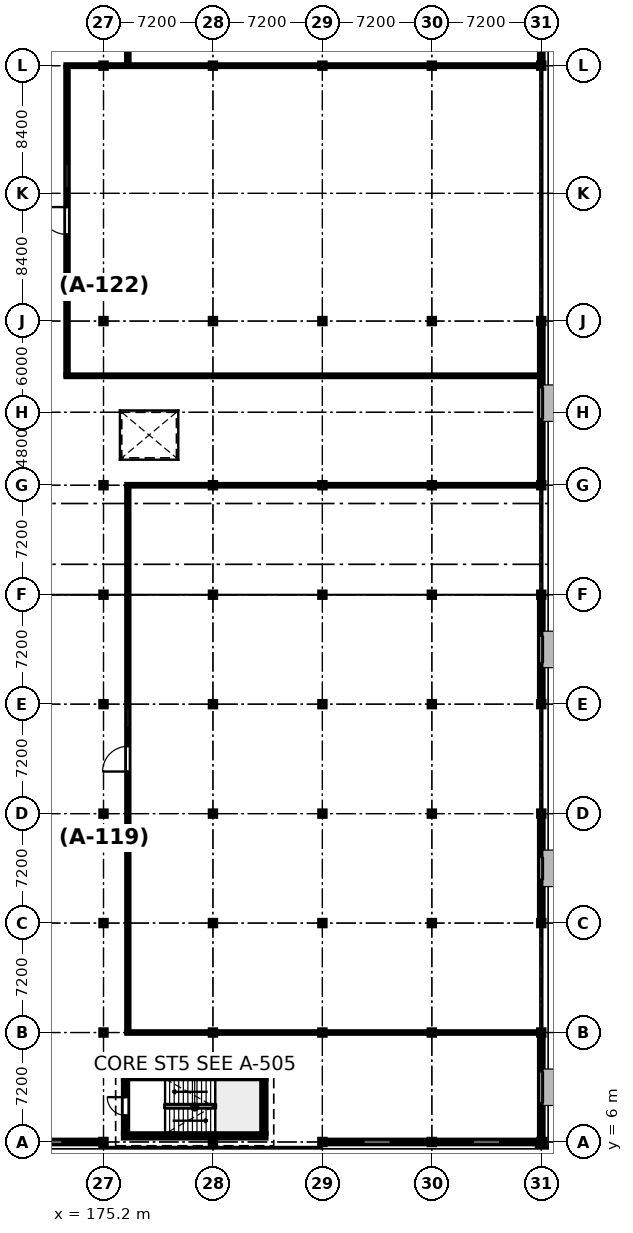
"""IFC4 building model, lengths in metres.
Left out: names, types, materials, properties, quantities, classifications, styles, units other than length and angle.
Written with IfcOpenShell. Run it as: python <this file> out.ifc"""

import sys

from ifc_helpers import new_model, si_unit, direction, frame, frame_2d, origin, origin_2d, place, context, subcontext, project, spatial, rectangle, i_section, extrude, element, fill, save


model = new_model("IFC4")
c1 = context("Model", 3, precision=1e-05, world=origin(), true_north=direction((0.0, 1.0)))
c2 = subcontext(c1, "Body", "Model", "MODEL_VIEW")
j1 = project(units=[si_unit("LENGTHUNIT", "METRE"), si_unit("PLANEANGLEUNIT", "RADIAN")], contexts=[c1])
p1 = place(None, origin())
s1 = spatial("IfcSite", under=j1, at=p1, CompositionType="ELEMENT")
p2 = place(p1, origin())
s2 = spatial("IfcBuilding", under=s1, at=p2, CompositionType="ELEMENT")
p3 = place(p2, frame((0.0, 0.0, 5.4)))
s3 = spatial("IfcBuildingStorey", under=s2, at=p3, CompositionType="ELEMENT", Elevation=5.4)
for number, where, z_axis, x_axis in (
    (1, (175.2, 6.0, 0.0), (0.0, 0.0, 1.0), (1.0, 0.0, 0.0)),
    (2, (175.2, 13.2, 0.0), (0.0, 0.0, 1.0), (1.0, 0.0, 0.0)),
    (3, (175.2, 20.4, 0.0), (0.0, 0.0, 1.0), (1.0, 0.0, 0.0)),
    (4, (175.2, 27.6, 0.0), (0.0, 0.0, 1.0), (1.0, 0.0, 0.0)),
    (5, (175.2, 34.8, 0.0), (0.0, 0.0, 1.0), (1.0, 0.0, 0.0)),
    (6, (175.2, 42.0, 0.0), (0.0, 0.0, 1.0), (1.0, 0.0, 0.0)),
    (7, (175.2, 49.2, 0.0), (0.0, 0.0, 1.0), (1.0, 0.0, 0.0)),
    (8, (175.2, 60.0, 0.0), (0.0, 0.0, 1.0), (1.0, 0.0, 0.0)),
    (9, (175.2, 76.8, 0.0), (0.0, 0.0, 1.0), (1.0, 0.0, 0.0)),
    (10, (182.4, 6.0, 0.0), (0.0, 0.0, 1.0), (1.0, 0.0, 0.0)),
    (11, (182.4, 13.2, 0.0), (0.0, 0.0, 1.0), (1.0, 0.0, 0.0)),
    (12, (182.4, 20.4, 0.0), (0.0, 0.0, 1.0), (1.0, 0.0, 0.0)),
    (13, (182.4, 27.6, 0.0), (0.0, 0.0, 1.0), (1.0, 0.0, 0.0)),
    (14, (182.4, 34.8, 0.0), (0.0, 0.0, 1.0), (1.0, 0.0, 0.0)),
    (15, (182.4, 42.0, 0.0), (0.0, 0.0, 1.0), (1.0, 0.0, 0.0)),
    (16, (182.4, 49.2, 0.0), (0.0, 0.0, 1.0), (1.0, 0.0, 0.0)),
    (17, (182.4, 60.0, 0.0), (0.0, 0.0, 1.0), (1.0, 0.0, 0.0)),
    (18, (182.4, 76.8, 0.0), (0.0, 0.0, 1.0), (1.0, 0.0, 0.0)),
    (19, (189.6, 6.0, 0.0), (0.0, 0.0, 1.0), (1.0, 0.0, 0.0)),
    (20, (189.6, 13.2, 0.0), (0.0, 0.0, 1.0), (1.0, 0.0, 0.0)),
    (21, (189.6, 20.4, 0.0), (0.0, 0.0, 1.0), (1.0, 0.0, 0.0)),
    (22, (189.6, 27.6, 0.0), (0.0, 0.0, 1.0), (1.0, 0.0, 0.0)),
    (23, (189.6, 34.8, 0.0), (0.0, 0.0, 1.0), (1.0, 0.0, 0.0)),
    (24, (189.6, 42.0, 0.0), (0.0, 0.0, 1.0), (1.0, 0.0, 0.0)),
    (25, (189.6, 49.2, 0.0), (0.0, 0.0, 1.0), (1.0, 0.0, 0.0)),
    (26, (189.6, 60.0, 0.0), (0.0, 0.0, 1.0), (1.0, 0.0, 0.0)),
    (27, (189.6, 76.8, 0.0), (0.0, 0.0, 1.0), (1.0, 0.0, 0.0)),
    (28, (196.8, 6.0, 0.0), (0.0, 0.0, 1.0), (1.0, 0.0, 0.0)),
    (29, (196.8, 13.2, 0.0), (0.0, 0.0, 1.0), (1.0, 0.0, 0.0)),
    (30, (196.8, 20.4, 0.0), (0.0, 0.0, 1.0), (1.0, 0.0, 0.0)),
    (31, (196.8, 27.6, 0.0), (0.0, 0.0, 1.0), (1.0, 0.0, 0.0)),
    (32, (196.8, 34.8, 0.0), (0.0, 0.0, 1.0), (1.0, 0.0, 0.0)),
    (33, (196.8, 42.0, 0.0), (0.0, 0.0, 1.0), (1.0, 0.0, 0.0)),
    (34, (196.8, 49.2, 0.0), (0.0, 0.0, 1.0), (1.0, 0.0, 0.0)),
    (35, (196.8, 60.0, 0.0), (0.0, 0.0, 1.0), (1.0, 0.0, 0.0)),
    (36, (196.8, 76.8, 0.0), (0.0, 0.0, 1.0), (1.0, 0.0, 0.0)),
    (37, (204.0, 6.0, 0.0), (0.0, 0.0, 1.0), (1.0, 0.0, 0.0)),
    (38, (204.0, 13.2, 0.0), (0.0, 0.0, 1.0), (1.0, 0.0, 0.0)),
    (39, (204.0, 20.4, 0.0), (0.0, 0.0, 1.0), (1.0, 0.0, 0.0)),
    (40, (204.0, 27.6, 0.0), (0.0, 0.0, 1.0), (1.0, 0.0, 0.0)),
    (41, (204.0, 34.8, 0.0), (0.0, 0.0, 1.0), (1.0, 0.0, 0.0)),
    (42, (204.0, 42.0, 0.0), (0.0, 0.0, 1.0), (1.0, 0.0, 0.0)),
    (43, (204.0, 49.2, 0.0), (0.0, 0.0, 1.0), (1.0, 0.0, 0.0)),
    (44, (204.0, 60.0, 0.0), (0.0, 0.0, 1.0), (1.0, 0.0, 0.0)),
    (45, (204.0, 76.8, 0.0), (0.0, 0.0, 1.0), (1.0, 0.0, 0.0)),
):
    element("IfcColumn", number, at=place(p3, frame(where, z_axis=z_axis, x_axis=x_axis)), inside=s3, PredefinedType="COLUMN", context=c2, shape_type="SweptSolid", body=[
        extrude(i_section(OverallWidth=0.373, OverallDepth=0.373, WebThickness=0.016, FlangeThickness=0.026, FilletRadius=0.015, at=origin_2d()), origin(), (0.0, 0.0, 1.0), 3.9),
    ])
p4 = place(p3, frame((204.0, 13.012, 0.0), z_axis=(0.0, 0.0, 1.0), x_axis=(0.0, -1.0, 0.0)))
e46 = element("IfcWall", 46, at=p4, inside=s3, PredefinedType="STANDARD", context=c2, shape_type="SweptSolid", body=[
    extrude(rectangle(XDim=6.824, YDim=0.26, at=frame_2d((3.412, 0.0))), origin(), (0.0, 0.0, 1.0), 3.043),
])
p5 = place(p4, frame((2.362, 0.0, 0.9)))
e47 = element("IfcOpeningElement", 47, at=p5, cuts=e46, PredefinedType="OPENING", context=c2, shape_type="SweptSolid", body=[
    extrude(rectangle(XDim=2.1, YDim=1.5, at=frame_2d((1.05, 0.75))), frame((0.0, 0.14, 0.0), z_axis=(0.0, -1.0, 0.0), x_axis=(1.0, 0.0, 0.0)), (0.0, 0.0, 1.0), 0.28),
])
p6 = place(p3, frame((204.0, 27.412, 0.0), z_axis=(0.0, 0.0, 1.0), x_axis=(0.0, -1.0, 0.0)))
e48 = element("IfcWall", 48, at=p6, inside=s3, PredefinedType="STANDARD", context=c2, shape_type="SweptSolid", body=[
    extrude(rectangle(XDim=6.824, YDim=0.26, at=frame_2d((3.412, 0.0))), origin(), (0.0, 0.0, 1.0), 3.043),
])
p7 = place(p6, frame((2.662, 0.0, 0.9)))
e49 = element("IfcOpeningElement", 49, at=p7, cuts=e48, PredefinedType="OPENING", context=c2, shape_type="SweptSolid", body=[
    extrude(rectangle(XDim=1.5, YDim=1.5, at=frame_2d((0.75, 0.75))), frame((0.0, 0.14, 0.0), z_axis=(0.0, -1.0, 0.0), x_axis=(1.0, 0.0, 0.0)), (0.0, 0.0, 1.0), 0.28),
])
p8 = place(p3, frame((204.0, 41.812, 0.0), z_axis=(0.0, 0.0, 1.0), x_axis=(0.0, -1.0, 0.0)))
e50 = element("IfcWall", 50, at=p8, inside=s3, PredefinedType="STANDARD", context=c2, shape_type="SweptSolid", body=[
    extrude(rectangle(XDim=6.824, YDim=0.26, at=frame_2d((3.412, 0.0))), origin(), (0.0, 0.0, 1.0), 3.043),
])
p9 = place(p8, frame((2.512, 0.0, 0.9)))
e51 = element("IfcOpeningElement", 51, at=p9, cuts=e50, PredefinedType="OPENING", context=c2, shape_type="SweptSolid", body=[
    extrude(rectangle(XDim=1.8, YDim=1.5, at=frame_2d((0.9, 0.75))), frame((0.0, 0.14, 0.0), z_axis=(0.0, -1.0, 0.0), x_axis=(1.0, 0.0, 0.0)), (0.0, 0.0, 1.0), 0.28),
])
p10 = place(p3, frame((204.0, 59.812, 0.0), z_axis=(0.0, 0.0, 1.0), x_axis=(0.0, -1.0, 0.0)))
e52 = element("IfcWall", 52, at=p10, inside=s3, PredefinedType="STANDARD", context=c2, shape_type="SweptSolid", body=[
    extrude(rectangle(XDim=10.424, YDim=0.26, at=frame_2d((5.212, 0.0))), origin(), (0.0, 0.0, 1.0), 3.043),
])
p11 = place(p10, frame((4.162, 0.0, 0.9)))
e53 = element("IfcOpeningElement", 53, at=p11, cuts=e52, PredefinedType="OPENING", context=c2, shape_type="SweptSolid", body=[
    extrude(rectangle(XDim=2.1, YDim=1.5, at=frame_2d((1.05, 0.75))), frame((0.0, 0.14, 0.0), z_axis=(0.0, -1.0, 0.0), x_axis=(1.0, 0.0, 0.0)), (0.0, 0.0, 1.0), 0.28),
])
p12 = place(p3, frame((204.0, 83.812, 0.0), z_axis=(0.0, 0.0, 1.0), x_axis=(0.0, -1.0, 0.0)))
e54 = element("IfcWall", 54, at=p12, inside=s3, PredefinedType="STANDARD", context=c2, shape_type="SweptSolid", body=[
    extrude(rectangle(XDim=6.824, YDim=0.26, at=frame_2d((3.412, 0.0))), origin(), (0.0, 0.0, 1.0), 3.043),
])
p13 = place(p12, frame((2.662, 0.0, 0.9)))
e55 = element("IfcOpeningElement", 55, at=p13, cuts=e54, PredefinedType="OPENING", context=c2, shape_type="SweptSolid", body=[
    extrude(rectangle(XDim=1.5, YDim=1.5, at=frame_2d((0.75, 0.75))), frame((0.0, 0.14, 0.0), z_axis=(0.0, -1.0, 0.0), x_axis=(1.0, 0.0, 0.0)), (0.0, 0.0, 1.0), 0.28),
])
p14 = place(p3, frame((175.006, 6.0, 0.0), z_axis=(0.0, 0.0, 1.0), x_axis=(-1.0, 0.0, 0.0)))
e56 = element("IfcWall", 56, at=p14, inside=s3, PredefinedType="STANDARD", context=c2, shape_type="SweptSolid", body=[
    extrude(rectangle(XDim=6.812, YDim=0.26, at=frame_2d((3.406, 0.0))), origin(), (0.0, 0.0, 1.0), 3.043),
])
p15 = place(p14, frame((2.506, 0.0, 0.9)))
e57 = element("IfcOpeningElement", 57, at=p15, cuts=e56, PredefinedType="OPENING", context=c2, shape_type="SweptSolid", body=[
    extrude(rectangle(XDim=1.8, YDim=1.5, at=frame_2d((0.9, 0.75))), frame((0.0, 0.14, 0.0), z_axis=(0.0, -1.0, 0.0), x_axis=(1.0, 0.0, 0.0)), (0.0, 0.0, 1.0), 0.28),
])
p16 = place(p3, frame((196.606, 6.0, 0.0), z_axis=(0.0, 0.0, 1.0), x_axis=(-1.0, 0.0, 0.0)))
e58 = element("IfcWall", 58, at=p16, inside=s3, PredefinedType="STANDARD", context=c2, shape_type="SweptSolid", body=[
    extrude(rectangle(XDim=6.812, YDim=0.26, at=frame_2d((3.406, 0.0))), origin(), (0.0, 0.0, 1.0), 3.043),
])
p17 = place(p16, frame((2.506, 0.0, 0.9)))
e59 = element("IfcOpeningElement", 59, at=p17, cuts=e58, PredefinedType="OPENING", context=c2, shape_type="SweptSolid", body=[
    extrude(rectangle(XDim=1.8, YDim=1.5, at=frame_2d((0.9, 0.75))), frame((0.0, 0.14, 0.0), z_axis=(0.0, -1.0, 0.0), x_axis=(1.0, 0.0, 0.0)), (0.0, 0.0, 1.0), 0.28),
])
p18 = place(p3, frame((203.806, 6.0, 0.0), z_axis=(0.0, 0.0, 1.0), x_axis=(-1.0, 0.0, 0.0)))
e60 = element("IfcWall", 60, at=p18, inside=s3, PredefinedType="STANDARD", context=c2, shape_type="SweptSolid", body=[
    extrude(rectangle(XDim=6.812, YDim=0.26, at=frame_2d((3.406, 0.0))), origin(), (0.0, 0.0, 1.0), 3.043),
])
p19 = place(p18, frame((2.506, 0.0, 0.9)))
e61 = element("IfcOpeningElement", 61, at=p19, cuts=e60, PredefinedType="OPENING", context=c2, shape_type="SweptSolid", body=[
    extrude(rectangle(XDim=1.8, YDim=1.5, at=frame_2d((0.9, 0.75))), frame((0.0, 0.14, 0.0), z_axis=(0.0, -1.0, 0.0), x_axis=(1.0, 0.0, 0.0)), (0.0, 0.0, 1.0), 0.28),
])
for number, where, z_axis, x_axis in (
    (62, (185.9, 6.4, 0.0), (0.0, 0.0, 1.0), (-1.0, 0.0, 0.0)),
    (63, (176.5, 10.3, 0.0), (0.0, 0.0, 1.0), (1.0, 0.0, 0.0)),
):
    element("IfcWall", number, at=place(p3, frame(where, z_axis=z_axis, x_axis=x_axis)), inside=s3, PredefinedType="SOLIDWALL", context=c2, shape_type="SweptSolid", body=[
        extrude(rectangle(XDim=9.4, YDim=0.3, at=frame_2d((4.7, 0.0))), origin(), (0.0, 0.0, 1.0), 3.67),
    ])
p20 = place(p3, frame((176.65, 6.55, 0.0), z_axis=(0.0, 0.0, 1.0), x_axis=(0.0, 1.0, 0.0)))
e64 = element("IfcWall", 64, at=p20, inside=s3, PredefinedType="SOLIDWALL", context=c2, shape_type="SweptSolid", body=[
    extrude(rectangle(XDim=3.6, YDim=0.3, at=frame_2d((1.8, 0.0))), origin(), (0.0, 0.0, 1.0), 3.67),
])
p21 = place(p20, frame((1.2, 0.0, 0.0)))
e65 = element("IfcOpeningElement", 65, at=p21, cuts=e64, PredefinedType="OPENING", context=c2, shape_type="SweptSolid", body=[
    extrude(rectangle(XDim=1.2, YDim=2.2, at=frame_2d((0.6, 1.1))), frame((0.0, 0.16, 0.0), z_axis=(0.0, -1.0, 0.0), x_axis=(1.0, 0.0, 0.0)), (0.0, 0.0, 1.0), 0.32),
])
p22 = place(p3, frame((185.75, 10.15, 0.0), z_axis=(0.0, 0.0, 1.0), x_axis=(0.0, -1.0, 0.0)))
e66 = element("IfcWall", 66, at=p22, inside=s3, PredefinedType="SOLIDWALL", context=c2, shape_type="SweptSolid", body=[
    extrude(rectangle(XDim=3.6, YDim=0.3, at=frame_2d((1.8, 0.0))), origin(), (0.0, 0.0, 1.0), 3.67),
])
p23 = place(p3, frame((203.868, 13.2, 0.0), z_axis=(0.0, 0.0, 1.0), x_axis=(-1.0, 0.0, 0.0)))
e67 = element("IfcWall", 67, at=p23, inside=s3, PredefinedType="PARTITIONING", context=c2, shape_type="SweptSolid", body=[
    extrude(rectangle(XDim=27.148, YDim=0.125, at=frame_2d((13.574, 0.0))), origin(), (0.0, 0.0, 1.0), 3.038),
])
p24 = place(p3, frame((176.72, 49.2, 0.0), z_axis=(0.0, 0.0, 1.0), x_axis=(1.0, 0.0, 0.0)))
e68 = element("IfcWall", 68, at=p24, inside=s3, PredefinedType="PARTITIONING", context=c2, shape_type="SweptSolid", body=[
    extrude(rectangle(XDim=27.148, YDim=0.13, at=frame_2d((13.574, 0.0))), origin(), (0.0, 0.0, 1.0), 3.038),
])
p25 = place(p3, frame((203.868, 56.4, 0.0), z_axis=(0.0, 0.0, 1.0), x_axis=(-1.0, 0.0, 0.0)))
e69 = element("IfcWall", 69, at=p25, inside=s3, PredefinedType="PARTITIONING", context=c2, shape_type="SweptSolid", body=[
    extrude(rectangle(XDim=31.148, YDim=0.135, at=frame_2d((15.574, 0.0))), origin(), (0.0, 0.0, 1.0), 3.038),
])
p26 = place(p3, frame((172.72, 76.8, 0.0), z_axis=(0.0, 0.0, 1.0), x_axis=(1.0, 0.0, 0.0)))
e70 = element("IfcWall", 70, at=p26, inside=s3, PredefinedType="PARTITIONING", context=c2, shape_type="SweptSolid", body=[
    extrude(rectangle(XDim=31.148, YDim=0.14, at=frame_2d((15.574, 0.0))), origin(), (0.0, 0.0, 1.0), 3.038),
])
p27 = place(p3, frame((176.8, 13.264, 0.0), z_axis=(0.0, 0.0, 1.0), x_axis=(0.0, 1.0, 0.0)))
e71 = element("IfcWall", 71, at=p27, inside=s3, PredefinedType="PARTITIONING", context=c2, shape_type="SweptSolid", body=[
    extrude(rectangle(XDim=35.869, YDim=0.17, at=frame_2d((17.935, 0.0))), origin(), (0.0, 0.0, 1.0), 3.038),
])
p28 = place(p27, frame((17.104, 0.0, 0.0)))
e72 = element("IfcOpeningElement", 72, at=p28, cuts=e71, PredefinedType="OPENING", context=c2, shape_type="SweptSolid", body=[
    extrude(rectangle(XDim=1.66, YDim=2.28, at=frame_2d((0.83, 1.14))), frame((0.0, 0.095, 0.0), z_axis=(0.0, -1.0, 0.0), x_axis=(1.0, 0.0, 0.0)), (0.0, 0.0, 1.0), 0.19),
])
p29 = place(p27, frame((20.014, 0.0, 0.95)))
e73 = element("IfcOpeningElement", 73, at=p29, cuts=e71, PredefinedType="OPENING", context=c2, shape_type="SweptSolid", body=[
    extrude(rectangle(XDim=1.3, YDim=1.45, at=frame_2d((0.65, 0.725))), frame((0.0, 0.095, 0.0), z_axis=(0.0, -1.0, 0.0), x_axis=(1.0, 0.0, 0.0)), (0.0, 0.0, 1.0), 0.19),
])
p30 = place(p3, frame((172.8, 56.47, 0.0), z_axis=(0.0, 0.0, 1.0), x_axis=(0.0, 1.0, 0.0)))
e74 = element("IfcWall", 74, at=p30, inside=s3, PredefinedType="PARTITIONING", context=c2, shape_type="SweptSolid", body=[
    extrude(rectangle(XDim=20.258, YDim=0.178, at=frame_2d((10.129, 0.0))), origin(), (0.0, 0.0, 1.0), 3.038),
])
p31 = place(p30, frame((9.229, 0.0, 0.0)))
e75 = element("IfcOpeningElement", 75, at=p31, cuts=e74, PredefinedType="OPENING", context=c2, shape_type="SweptSolid", body=[
    extrude(rectangle(XDim=1.8, YDim=2.28, at=frame_2d((0.9, 1.14))), frame((0.0, 0.099, 0.0), z_axis=(0.0, -1.0, 0.0), x_axis=(1.0, 0.0, 0.0)), (0.0, 0.0, 1.0), 0.198),
])
p32 = place(p30, frame((12.279, 0.0, 0.95)))
e76 = element("IfcOpeningElement", 76, at=p32, cuts=e74, PredefinedType="OPENING", context=c2, shape_type="SweptSolid", body=[
    extrude(rectangle(XDim=1.6, YDim=1.45, at=frame_2d((0.8, 0.725))), frame((0.0, 0.099, 0.0), z_axis=(0.0, -1.0, 0.0), x_axis=(1.0, 0.0, 0.0)), (0.0, 0.0, 1.0), 0.198),
])
p33 = place(p3, frame((176.8, 76.872, 0.0), z_axis=(0.0, 0.0, 1.0), x_axis=(0.0, 1.0, 0.0)))
e77 = element("IfcWall", 77, at=p33, inside=s3, PredefinedType="PARTITIONING", context=c2, shape_type="SweptSolid", body=[
    extrude(rectangle(XDim=38.576, YDim=0.185, at=frame_2d((19.288, 0.0))), origin(), (0.0, 0.0, 1.0), 3.038),
])
p34 = place(p33, frame((18.813, 0.0, 0.0)))
e78 = element("IfcOpeningElement", 78, at=p34, cuts=e77, PredefinedType="OPENING", context=c2, shape_type="SweptSolid", body=[
    extrude(rectangle(XDim=0.95, YDim=2.34, at=frame_2d((0.475, 1.17))), frame((0.0, 0.103, 0.0), z_axis=(0.0, -1.0, 0.0), x_axis=(1.0, 0.0, 0.0)), (0.0, 0.0, 1.0), 0.205),
])
p35 = place(p33, frame((21.013, 0.0, 0.95)))
e79 = element("IfcOpeningElement", 79, at=p35, cuts=e77, PredefinedType="OPENING", context=c2, shape_type="SweptSolid", body=[
    extrude(rectangle(XDim=2.0, YDim=1.45, at=frame_2d((1.0, 0.725))), frame((0.0, 0.103, 0.0), z_axis=(0.0, -1.0, 0.0), x_axis=(1.0, 0.0, 0.0)), (0.0, 0.0, 1.0), 0.205),
])
p36 = place(p5, origin())
e80 = element("IfcWindow", 80, at=p36, inside=s3, PartitioningType="SINGLE_PANEL", PredefinedType="WINDOW", context=c2, shape_type="SweptSolid", body=[
    extrude(rectangle(XDim=2.1, YDim=1.5, at=frame_2d((1.05, 0.75))), frame((0.0, 0.03, 0.0), z_axis=(0.0, -1.0, 0.0), x_axis=(1.0, 0.0, 0.0)), (0.0, 0.0, 1.0), 0.06),
])
fill(e47, e80)
p37 = place(p7, origin())
e81 = element("IfcWindow", 81, at=p37, inside=s3, PartitioningType="SINGLE_PANEL", PredefinedType="WINDOW", context=c2, shape_type="SweptSolid", body=[
    extrude(rectangle(XDim=1.5, YDim=1.5, at=frame_2d((0.75, 0.75))), frame((0.0, 0.03, 0.0), z_axis=(0.0, -1.0, 0.0), x_axis=(1.0, 0.0, 0.0)), (0.0, 0.0, 1.0), 0.06),
])
fill(e49, e81)
p38 = place(p9, origin())
e82 = element("IfcWindow", 82, at=p38, inside=s3, PartitioningType="SINGLE_PANEL", PredefinedType="WINDOW", context=c2, shape_type="SweptSolid", body=[
    extrude(rectangle(XDim=1.8, YDim=1.5, at=frame_2d((0.9, 0.75))), frame((0.0, 0.03, 0.0), z_axis=(0.0, -1.0, 0.0), x_axis=(1.0, 0.0, 0.0)), (0.0, 0.0, 1.0), 0.06),
])
fill(e51, e82)
p39 = place(p11, origin())
e83 = element("IfcWindow", 83, at=p39, inside=s3, PartitioningType="SINGLE_PANEL", PredefinedType="WINDOW", context=c2, shape_type="SweptSolid", body=[
    extrude(rectangle(XDim=2.1, YDim=1.5, at=frame_2d((1.05, 0.75))), frame((0.0, 0.03, 0.0), z_axis=(0.0, -1.0, 0.0), x_axis=(1.0, 0.0, 0.0)), (0.0, 0.0, 1.0), 0.06),
])
fill(e53, e83)
p40 = place(p15, origin())
e84 = element("IfcWindow", 84, at=p40, inside=s3, PartitioningType="SINGLE_PANEL", PredefinedType="WINDOW", context=c2, shape_type="SweptSolid", body=[
    extrude(rectangle(XDim=1.8, YDim=1.5, at=frame_2d((0.9, 0.75))), frame((0.0, 0.03, 0.0), z_axis=(0.0, -1.0, 0.0), x_axis=(1.0, 0.0, 0.0)), (0.0, 0.0, 1.0), 0.06),
])
fill(e57, e84)
p41 = place(p17, origin())
e85 = element("IfcWindow", 85, at=p41, inside=s3, PartitioningType="SINGLE_PANEL", PredefinedType="WINDOW", context=c2, shape_type="SweptSolid", body=[
    extrude(rectangle(XDim=1.8, YDim=1.5, at=frame_2d((0.9, 0.75))), frame((0.0, 0.03, 0.0), z_axis=(0.0, -1.0, 0.0), x_axis=(1.0, 0.0, 0.0)), (0.0, 0.0, 1.0), 0.06),
])
fill(e59, e85)
p42 = place(p19, origin())
e86 = element("IfcWindow", 86, at=p42, inside=s3, PartitioningType="SINGLE_PANEL", PredefinedType="WINDOW", context=c2, shape_type="SweptSolid", body=[
    extrude(rectangle(XDim=1.8, YDim=1.5, at=frame_2d((0.9, 0.75))), frame((0.0, 0.03, 0.0), z_axis=(0.0, -1.0, 0.0), x_axis=(1.0, 0.0, 0.0)), (0.0, 0.0, 1.0), 0.06),
])
fill(e61, e86)
p43 = place(p21, origin())
e87 = element("IfcDoor", 87, at=p43, inside=s3, OperationType="SINGLE_SWING_RIGHT", PredefinedType="DOOR", context=c2, shape_type="SweptSolid", body=[
    extrude(rectangle(XDim=1.2, YDim=2.2, at=frame_2d((0.6, 1.1))), frame((0.0, 0.025, 0.0), z_axis=(0.0, -1.0, 0.0), x_axis=(1.0, 0.0, 0.0)), (0.0, 0.0, 1.0), 0.05),
])
fill(e65, e87)
p44 = place(p28, origin())
e88 = element("IfcDoor", 88, at=p44, inside=s3, OperationType="SINGLE_SWING_LEFT", PredefinedType="DOOR", context=c2, shape_type="SweptSolid", body=[
    extrude(rectangle(XDim=1.66, YDim=2.28, at=frame_2d((0.83, 1.14))), frame((0.0, 0.025, 0.0), z_axis=(0.0, -1.0, 0.0), x_axis=(1.0, 0.0, 0.0)), (0.0, 0.0, 1.0), 0.05),
])
fill(e72, e88)
p45 = place(p29, origin())
e89 = element("IfcWindow", 89, at=p45, inside=s3, PartitioningType="SINGLE_PANEL", PredefinedType="WINDOW", context=c2, shape_type="SweptSolid", body=[
    extrude(rectangle(XDim=1.3, YDim=1.45, at=frame_2d((0.65, 0.725))), frame((0.0, 0.03, 0.0), z_axis=(0.0, -1.0, 0.0), x_axis=(1.0, 0.0, 0.0)), (0.0, 0.0, 1.0), 0.06),
])
fill(e73, e89)
p46 = place(p31, origin())
e90 = element("IfcDoor", 90, at=p46, inside=s3, OperationType="SINGLE_SWING_RIGHT", PredefinedType="DOOR", context=c2, shape_type="SweptSolid", body=[
    extrude(rectangle(XDim=1.8, YDim=2.28, at=frame_2d((0.9, 1.14))), frame((0.0, 0.025, 0.0), z_axis=(0.0, -1.0, 0.0), x_axis=(1.0, 0.0, 0.0)), (0.0, 0.0, 1.0), 0.05),
])
fill(e75, e90)
p47 = place(p32, origin())
e91 = element("IfcWindow", 91, at=p47, inside=s3, PartitioningType="SINGLE_PANEL", PredefinedType="WINDOW", context=c2, shape_type="SweptSolid", body=[
    extrude(rectangle(XDim=1.6, YDim=1.45, at=frame_2d((0.8, 0.725))), frame((0.0, 0.03, 0.0), z_axis=(0.0, -1.0, 0.0), x_axis=(1.0, 0.0, 0.0)), (0.0, 0.0, 1.0), 0.06),
])
fill(e76, e91)
save(model, sys.argv[1])
